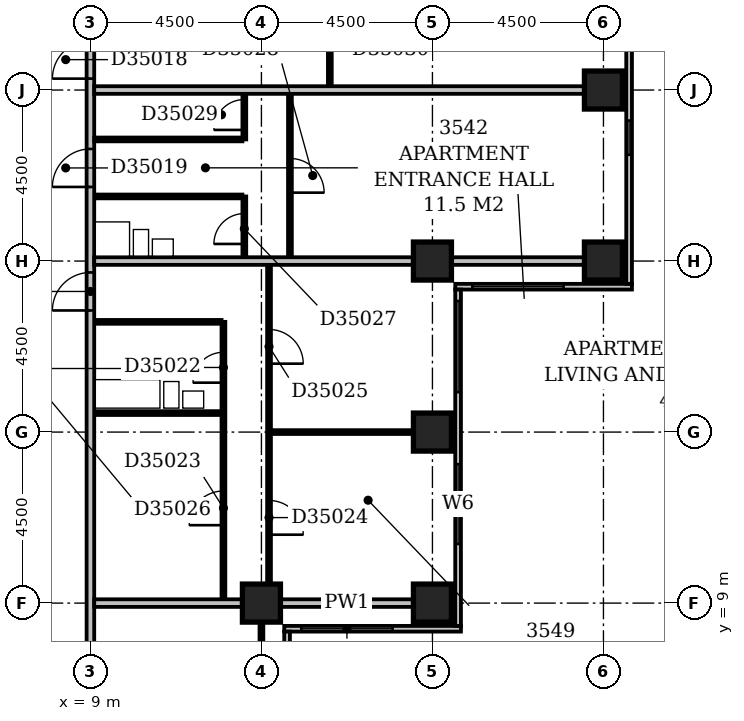
"""IFC4 building model, lengths in metres.
Left out: names, types, materials, properties, quantities, classifications, styles, units other than length and angle.
Written with IfcOpenShell. Run it as: python <this file> out.ifc"""

import sys

from ifc_helpers import new_model, si_unit, direction, frame, frame_2d, origin, origin_2d, place, context, subcontext, project, spatial, rectangle, extrude, element, fill, save


model = new_model("IFC4")
c1 = context("Model", 3, precision=1e-05, world=origin(), true_north=direction((0.0, 1.0)))
c2 = subcontext(c1, "Body", "Model", "MODEL_VIEW")
j1 = project(units=[si_unit("LENGTHUNIT", "METRE"), si_unit("PLANEANGLEUNIT", "RADIAN")], contexts=[c1])
p1 = place(None, origin())
s1 = spatial("IfcSite", under=j1, at=p1, CompositionType="ELEMENT")
p2 = place(p1, origin())
s2 = spatial("IfcBuilding", under=s1, at=p2, CompositionType="ELEMENT")
p3 = place(p2, frame((0.0, 0.0, 141.2)))
s3 = spatial("IfcBuildingStorey", under=s2, at=p3, CompositionType="ELEMENT", Elevation=141.2)
for number, where, z_axis, x_axis in (
    (1, (13.5, 9.0, -0.3), (0.0, 0.0, 1.0), (1.0, 0.0, 0.0)),
    (2, (18.0, 9.0, -0.3), (0.0, 0.0, 1.0), (1.0, 0.0, 0.0)),
    (3, (18.0, 13.5, -0.3), (0.0, 0.0, 1.0), (1.0, 0.0, 0.0)),
    (4, (18.0, 18.0, -0.3), (0.0, 0.0, 1.0), (1.0, 0.0, 0.0)),
    (5, (22.5, 18.0, -0.3), (0.0, 0.0, 1.0), (1.0, 0.0, 0.0)),
    (6, (22.5, 22.5, -0.3), (0.0, 0.0, 1.0), (1.0, 0.0, 0.0)),
):
    element("IfcColumn", number, at=place(p3, frame(where, z_axis=z_axis, x_axis=x_axis)), inside=s3, PredefinedType="COLUMN", context=c2, shape_type="SweptSolid", body=[
        extrude(rectangle(XDim=1.0, YDim=1.0, at=origin_2d()), origin(), (0.0, 0.0, 1.0), 3.6),
    ])
p4 = place(p3, frame((14.175, 3.9, 0.0), z_axis=(0.0, 0.0, 1.0), x_axis=(0.0, 1.0, 0.0)))
e7 = element("IfcWall", 7, at=p4, inside=s3, PredefinedType="STANDARD", context=c2, shape_type="SweptSolid", body=[
    extrude(rectangle(XDim=4.35, YDim=0.15, at=frame_2d((2.175, 0.0))), origin(), (0.0, 0.0, 1.0), 2.7),
])
p5 = place(p4, frame((1.65, 0.0, 0.6)))
e8 = element("IfcOpeningElement", 8, at=p5, cuts=e7, PredefinedType="OPENING", context=c2, shape_type="SweptSolid", body=[
    extrude(rectangle(XDim=2.4, YDim=1.8, at=frame_2d((1.2, 0.9))), frame((0.0, 0.087, 0.0), z_axis=(0.0, -1.0, 0.0), x_axis=(1.0, 0.0, 0.0)), (0.0, 0.0, 1.0), 0.174),
])
p6 = place(p3, frame((14.1, 8.325, 0.0), z_axis=(0.0, 0.0, 1.0), x_axis=(1.0, 0.0, 0.0)))
e9 = element("IfcWall", 9, at=p6, inside=s3, PredefinedType="STANDARD", context=c2, shape_type="SweptSolid", body=[
    extrude(rectangle(XDim=4.65, YDim=0.15, at=frame_2d((2.325, 0.0))), origin(), (0.0, 0.0, 1.0), 2.7),
])
p7 = place(p6, frame((0.45, 0.0, 0.6)))
e10 = element("IfcOpeningElement", 10, at=p7, cuts=e9, PredefinedType="OPENING", context=c2, shape_type="SweptSolid", body=[
    extrude(rectangle(XDim=2.4, YDim=1.8, at=frame_2d((1.2, 0.9))), frame((0.0, 0.087, 0.0), z_axis=(0.0, -1.0, 0.0), x_axis=(1.0, 0.0, 0.0)), (0.0, 0.0, 1.0), 0.174),
])
p8 = place(p3, frame((18.675, 8.4, 0.0), z_axis=(0.0, 0.0, 1.0), x_axis=(0.0, 1.0, 0.0)))
e11 = element("IfcWall", 11, at=p8, inside=s3, PredefinedType="STANDARD", context=c2, shape_type="SweptSolid", body=[
    extrude(rectangle(XDim=8.85, YDim=0.15, at=frame_2d((4.425, 0.0))), origin(), (0.0, 0.0, 1.0), 2.7),
])
p9 = place(p8, frame((2.156, 0.0, 0.6)))
e12 = element("IfcOpeningElement", 12, at=p9, cuts=e11, PredefinedType="OPENING", context=c2, shape_type="SweptSolid", body=[
    extrude(rectangle(XDim=2.1, YDim=1.8, at=frame_2d((1.05, 0.9))), frame((0.0, 0.087, 0.0), z_axis=(0.0, -1.0, 0.0), x_axis=(1.0, 0.0, 0.0)), (0.0, 0.0, 1.0), 0.174),
])
p10 = place(p8, frame((6.15, 0.0, 0.6)))
e13 = element("IfcOpeningElement", 13, at=p10, cuts=e11, PredefinedType="OPENING", context=c2, shape_type="SweptSolid", body=[
    extrude(rectangle(XDim=2.4, YDim=1.8, at=frame_2d((1.2, 0.9))), frame((0.0, 0.087, 0.0), z_axis=(0.0, -1.0, 0.0), x_axis=(1.0, 0.0, 0.0)), (0.0, 0.0, 1.0), 0.174),
])
p11 = place(p3, frame((18.6, 17.325, 0.0), z_axis=(0.0, 0.0, 1.0), x_axis=(1.0, 0.0, 0.0)))
e14 = element("IfcWall", 14, at=p11, inside=s3, PredefinedType="STANDARD", context=c2, shape_type="SweptSolid", body=[
    extrude(rectangle(XDim=4.65, YDim=0.15, at=frame_2d((2.325, 0.0))), origin(), (0.0, 0.0, 1.0), 2.7),
])
p12 = place(p11, frame((0.45, 0.0, 0.6)))
e15 = element("IfcOpeningElement", 15, at=p12, cuts=e14, PredefinedType="OPENING", context=c2, shape_type="SweptSolid", body=[
    extrude(rectangle(XDim=2.4, YDim=1.8, at=frame_2d((1.2, 0.9))), frame((0.0, 0.087, 0.0), z_axis=(0.0, -1.0, 0.0), x_axis=(1.0, 0.0, 0.0)), (0.0, 0.0, 1.0), 0.174),
])
p13 = place(p3, frame((23.175, 17.4, 0.0), z_axis=(0.0, 0.0, 1.0), x_axis=(0.0, 1.0, 0.0)))
e16 = element("IfcWall", 16, at=p13, inside=s3, PredefinedType="STANDARD", context=c2, shape_type="SweptSolid", body=[
    extrude(rectangle(XDim=17.85, YDim=0.15, at=frame_2d((8.925, 0.0))), origin(), (0.0, 0.0, 1.0), 2.7),
])
p14 = place(p13, frame((3.397, 0.0, 0.6)))
e17 = element("IfcOpeningElement", 17, at=p14, cuts=e16, PredefinedType="OPENING", context=c2, shape_type="SweptSolid", body=[
    extrude(rectangle(XDim=0.9, YDim=1.8, at=frame_2d((0.45, 0.9))), frame((0.0, 0.087, 0.0), z_axis=(0.0, -1.0, 0.0), x_axis=(1.0, 0.0, 0.0)), (0.0, 0.0, 1.0), 0.174),
])
p15 = place(p13, frame((6.15, 0.0, 0.6)))
e18 = element("IfcOpeningElement", 18, at=p15, cuts=e16, PredefinedType="OPENING", context=c2, shape_type="SweptSolid", body=[
    extrude(rectangle(XDim=2.4, YDim=1.8, at=frame_2d((1.2, 0.9))), frame((0.0, 0.087, 0.0), z_axis=(0.0, -1.0, 0.0), x_axis=(1.0, 0.0, 0.0)), (0.0, 0.0, 1.0), 0.174),
])
p16 = place(p13, frame((10.65, 0.0, 0.6)))
e19 = element("IfcOpeningElement", 19, at=p16, cuts=e16, PredefinedType="OPENING", context=c2, shape_type="SweptSolid", body=[
    extrude(rectangle(XDim=2.4, YDim=1.8, at=frame_2d((1.2, 0.9))), frame((0.0, 0.087, 0.0), z_axis=(0.0, -1.0, 0.0), x_axis=(1.0, 0.0, 0.0)), (0.0, 0.0, 1.0), 0.174),
])
p17 = place(p13, frame((15.15, 0.0, 0.6)))
e20 = element("IfcOpeningElement", 20, at=p17, cuts=e16, PredefinedType="OPENING", context=c2, shape_type="SweptSolid", body=[
    extrude(rectangle(XDim=2.4, YDim=1.8, at=frame_2d((1.2, 0.9))), frame((0.0, 0.087, 0.0), z_axis=(0.0, -1.0, 0.0), x_axis=(1.0, 0.0, 0.0)), (0.0, 0.0, 1.0), 0.174),
])
p18 = place(p3, frame((9.0, 5.0, 0.0), z_axis=(0.0, 0.0, 1.0), x_axis=(0.0, 1.0, 0.0)))
e21 = element("IfcWall", 21, at=p18, inside=s3, PredefinedType="PARTITIONING", context=c2, shape_type="SweptSolid", body=[
    extrude(rectangle(XDim=27.75, YDim=0.2, at=frame_2d((13.875, 0.0))), origin(), (0.0, 0.0, 1.0), 3.3),
])
p19 = place(p18, frame((17.8, 0.0, 0.0)))
e22 = element("IfcOpeningElement", 22, at=p19, cuts=e21, PredefinedType="OPENING", context=c2, shape_type="SweptSolid", body=[
    extrude(rectangle(XDim=1.0, YDim=2.1, at=frame_2d((0.5, 1.05))), frame((0.0, 0.112, 0.0), z_axis=(0.0, -1.0, 0.0), x_axis=(1.0, 0.0, 0.0)), (0.0, 0.0, 1.0), 0.224),
])
p20 = place(p18, frame((14.95, 0.0, 0.0)))
e23 = element("IfcOpeningElement", 23, at=p20, cuts=e21, PredefinedType="OPENING", context=c2, shape_type="SweptSolid", body=[
    extrude(rectangle(XDim=1.0, YDim=2.1, at=frame_2d((0.5, 1.05))), frame((0.0, 0.112, 0.0), z_axis=(0.0, -1.0, 0.0), x_axis=(1.0, 0.0, 0.0)), (0.0, 0.0, 1.0), 0.224),
])
p21 = place(p18, frame((11.7, 0.0, 0.0)))
e24 = element("IfcOpeningElement", 24, at=p21, cuts=e21, PredefinedType="OPENING", context=c2, shape_type="SweptSolid", body=[
    extrude(rectangle(XDim=1.0, YDim=2.1, at=frame_2d((0.5, 1.05))), frame((0.0, 0.112, 0.0), z_axis=(0.0, -1.0, 0.0), x_axis=(1.0, 0.0, 0.0)), (0.0, 0.0, 1.0), 0.224),
])
p22 = place(p18, frame((1.5, 0.0, 0.0)))
e25 = element("IfcOpeningElement", 25, at=p22, cuts=e21, PredefinedType="OPENING", context=c2, shape_type="SweptSolid", body=[
    extrude(rectangle(XDim=0.9, YDim=2.1, at=frame_2d((0.45, 1.05))), frame((0.0, 0.112, 0.0), z_axis=(0.0, -1.0, 0.0), x_axis=(1.0, 0.0, 0.0)), (0.0, 0.0, 1.0), 0.224),
])
p23 = place(p3, frame((13.5, 5.0, 0.0), z_axis=(0.0, 0.0, 1.0), x_axis=(0.0, 1.0, 0.0)))
e26 = element("IfcWall", 26, at=p23, inside=s3, PredefinedType="PARTITIONING", context=c2, shape_type="SweptSolid", body=[
    extrude(rectangle(XDim=3.5, YDim=0.1, at=frame_2d((1.75, 0.0))), origin(), (0.0, 0.0, 1.0), 2.7),
])
p24 = place(p3, frame((9.1, 9.0, 0.0), z_axis=(0.0, 0.0, 1.0), x_axis=(1.0, 0.0, 0.0)))
e27 = element("IfcWall", 27, at=p24, inside=s3, PredefinedType="PARTITIONING", context=c2, shape_type="SweptSolid", body=[
    extrude(rectangle(XDim=3.9, YDim=0.2, at=frame_2d((1.95, 0.0))), origin(), (0.0, 0.0, 1.0), 3.3),
])
p25 = place(p3, frame((14.0, 9.0, 0.0), z_axis=(0.0, 0.0, 1.0), x_axis=(1.0, 0.0, 0.0)))
e28 = element("IfcWall", 28, at=p25, inside=s3, PredefinedType="PARTITIONING", context=c2, shape_type="SweptSolid", body=[
    extrude(rectangle(XDim=3.5, YDim=0.2, at=frame_2d((1.75, 0.0))), origin(), (0.0, 0.0, 1.0), 2.7),
])
p26 = place(p3, frame((12.5, 9.1, 0.0), z_axis=(0.0, 0.0, 1.0), x_axis=(0.0, 1.0, 0.0)))
e29 = element("IfcWall", 29, at=p26, inside=s3, PredefinedType="PARTITIONING", context=c2, shape_type="SweptSolid", body=[
    extrude(rectangle(XDim=7.3, YDim=0.1, at=frame_2d((3.65, 0.0))), origin(), (0.0, 0.0, 1.0), 3.3),
])
p27 = place(p26, frame((5.7, 0.0, 0.0)))
e30 = element("IfcOpeningElement", 30, at=p27, cuts=e29, PredefinedType="OPENING", context=c2, shape_type="SweptSolid", body=[
    extrude(rectangle(XDim=0.8, YDim=2.1, at=frame_2d((0.4, 1.05))), frame((0.0, 0.062, 0.0), z_axis=(0.0, -1.0, 0.0), x_axis=(1.0, 0.0, 0.0)), (0.0, 0.0, 1.0), 0.124),
])
p28 = place(p26, frame((1.95, 0.0, 0.0)))
e31 = element("IfcOpeningElement", 31, at=p28, cuts=e29, PredefinedType="OPENING", context=c2, shape_type="SweptSolid", body=[
    extrude(rectangle(XDim=0.9, YDim=2.1, at=frame_2d((0.45, 1.05))), frame((0.0, 0.062, 0.0), z_axis=(0.0, -1.0, 0.0), x_axis=(1.0, 0.0, 0.0)), (0.0, 0.0, 1.0), 0.124),
])
p29 = place(p3, frame((13.7, 9.5, 0.0), z_axis=(0.0, 0.0, 1.0), x_axis=(0.0, 1.0, 0.0)))
e32 = element("IfcWall", 32, at=p29, inside=s3, PredefinedType="PARTITIONING", context=c2, shape_type="SweptSolid", body=[
    extrude(rectangle(XDim=8.4, YDim=0.1, at=frame_2d((4.2, 0.0))), origin(), (0.0, 0.0, 1.0), 3.3),
])
p30 = place(p29, frame((1.3, 0.0, 0.0)))
e33 = element("IfcOpeningElement", 33, at=p30, cuts=e32, PredefinedType="OPENING", context=c2, shape_type="SweptSolid", body=[
    extrude(rectangle(XDim=0.9, YDim=2.1, at=frame_2d((0.45, 1.05))), frame((0.0, 0.062, 0.0), z_axis=(0.0, -1.0, 0.0), x_axis=(1.0, 0.0, 0.0)), (0.0, 0.0, 1.0), 0.124),
])
p31 = place(p29, frame((5.8, 0.0, 0.0)))
e34 = element("IfcOpeningElement", 34, at=p31, cuts=e32, PredefinedType="OPENING", context=c2, shape_type="SweptSolid", body=[
    extrude(rectangle(XDim=0.9, YDim=2.1, at=frame_2d((0.45, 1.05))), frame((0.0, 0.062, 0.0), z_axis=(0.0, -1.0, 0.0), x_axis=(1.0, 0.0, 0.0)), (0.0, 0.0, 1.0), 0.124),
])
p32 = place(p3, frame((13.75, 13.5, 0.0), z_axis=(0.0, 0.0, 1.0), x_axis=(1.0, 0.0, 0.0)))
e35 = element("IfcWall", 35, at=p32, inside=s3, PredefinedType="PARTITIONING", context=c2, shape_type="SweptSolid", body=[
    extrude(rectangle(XDim=3.75, YDim=0.1, at=frame_2d((1.875, 0.0))), origin(), (0.0, 0.0, 1.0), 3.3),
])
for number, where, z_axis, x_axis in (
    (36, (9.1, 14.0, 0.0), (0.0, 0.0, 1.0), (1.0, 0.0, 0.0)),
    (37, (9.1, 16.4, 0.0), (0.0, 0.0, 1.0), (1.0, 0.0, 0.0)),
):
    element("IfcWall", number, at=place(p3, frame(where, z_axis=z_axis, x_axis=x_axis)), inside=s3, PredefinedType="PLUMBINGWALL", context=c2, shape_type="SweptSolid", body=[
        extrude(rectangle(XDim=3.35, YDim=0.1, at=frame_2d((1.675, 0.0))), origin(), (0.0, 0.0, 1.0), 3.3),
    ])
p33 = place(p3, frame((9.1, 18.0, 0.0), z_axis=(0.0, 0.0, 1.0), x_axis=(1.0, 0.0, 0.0)))
e38 = element("IfcWall", 38, at=p33, inside=s3, PredefinedType="PARTITIONING", context=c2, shape_type="SweptSolid", body=[
    extrude(rectangle(XDim=8.4, YDim=0.2, at=frame_2d((4.2, 0.0))), origin(), (0.0, 0.0, 1.0), 2.6),
])
p34 = place(p3, frame((18.5, 18.0, 0.0), z_axis=(0.0, 0.0, 1.0), x_axis=(1.0, 0.0, 0.0)))
e39 = element("IfcWall", 39, at=p34, inside=s3, PredefinedType="PARTITIONING", context=c2, shape_type="SweptSolid", body=[
    extrude(rectangle(XDim=3.5, YDim=0.2, at=frame_2d((1.75, 0.0))), origin(), (0.0, 0.0, 1.0), 2.7),
])
p35 = place(p3, frame((13.05, 18.1, 0.0), z_axis=(0.0, 0.0, 1.0), x_axis=(0.0, 1.0, 0.0)))
e40 = element("IfcWall", 40, at=p35, inside=s3, PredefinedType="PARTITIONING", context=c2, shape_type="SweptSolid", body=[
    extrude(rectangle(XDim=1.6, YDim=0.1, at=frame_2d((0.8, 0.0))), origin(), (0.0, 0.0, 1.0), 3.3),
])
p36 = place(p35, frame((0.35, 0.0, 0.0)))
e41 = element("IfcOpeningElement", 41, at=p36, cuts=e40, PredefinedType="OPENING", context=c2, shape_type="SweptSolid", body=[
    extrude(rectangle(XDim=0.8, YDim=2.1, at=frame_2d((0.4, 1.05))), frame((0.0, 0.062, 0.0), z_axis=(0.0, -1.0, 0.0), x_axis=(1.0, 0.0, 0.0)), (0.0, 0.0, 1.0), 0.124),
])
p37 = place(p3, frame((14.25, 18.1, 0.0), z_axis=(0.0, 0.0, 1.0), x_axis=(0.0, 1.0, 0.0)))
e42 = element("IfcWall", 42, at=p37, inside=s3, PredefinedType="PARTITIONING", context=c2, shape_type="SweptSolid", body=[
    extrude(rectangle(XDim=4.3, YDim=0.1, at=frame_2d((2.15, 0.0))), origin(), (0.0, 0.0, 1.0), 3.3),
])
p38 = place(p37, frame((1.7, 0.0, 0.0)))
e43 = element("IfcOpeningElement", 43, at=p38, cuts=e42, PredefinedType="OPENING", context=c2, shape_type="SweptSolid", body=[
    extrude(rectangle(XDim=0.9, YDim=2.1, at=frame_2d((0.45, 1.05))), frame((0.0, 0.062, 0.0), z_axis=(0.0, -1.0, 0.0), x_axis=(1.0, 0.0, 0.0)), (0.0, 0.0, 1.0), 0.124),
])
p39 = place(p3, frame((9.1, 19.7, 0.0), z_axis=(0.0, 0.0, 1.0), x_axis=(1.0, 0.0, 0.0)))
e44 = element("IfcWall", 44, at=p39, inside=s3, PredefinedType="PLUMBINGWALL", context=c2, shape_type="SweptSolid", body=[
    extrude(rectangle(XDim=3.9, YDim=0.1, at=frame_2d((1.95, 0.0))), origin(), (0.0, 0.0, 1.0), 3.3),
])
p40 = place(p3, frame((9.1, 21.2, 0.0), z_axis=(0.0, 0.0, 1.0), x_axis=(1.0, 0.0, 0.0)))
e45 = element("IfcWall", 45, at=p40, inside=s3, PredefinedType="PARTITIONING", context=c2, shape_type="SweptSolid", body=[
    extrude(rectangle(XDim=3.9, YDim=0.1, at=frame_2d((1.95, 0.0))), origin(), (0.0, 0.0, 1.0), 3.3),
])
p41 = place(p3, frame((13.05, 21.2, 0.0), z_axis=(0.0, 0.0, 1.0), x_axis=(0.0, 1.0, 0.0)))
e46 = element("IfcWall", 46, at=p41, inside=s3, PredefinedType="PARTITIONING", context=c2, shape_type="SweptSolid", body=[
    extrude(rectangle(XDim=1.2, YDim=0.1, at=frame_2d((0.6, 0.0))), origin(), (0.0, 0.0, 1.0), 3.3),
])
p42 = place(p41, frame((0.25, 0.0, 0.0)))
e47 = element("IfcOpeningElement", 47, at=p42, cuts=e46, PredefinedType="OPENING", context=c2, shape_type="SweptSolid", body=[
    extrude(rectangle(XDim=0.8, YDim=2.1, at=frame_2d((0.4, 1.05))), frame((0.0, 0.062, 0.0), z_axis=(0.0, -1.0, 0.0), x_axis=(1.0, 0.0, 0.0)), (0.0, 0.0, 1.0), 0.124),
])
p43 = place(p3, frame((9.1, 22.5, 0.0), z_axis=(0.0, 0.0, 1.0), x_axis=(1.0, 0.0, 0.0)))
e48 = element("IfcWall", 48, at=p43, inside=s3, PredefinedType="PARTITIONING", context=c2, shape_type="SweptSolid", body=[
    extrude(rectangle(XDim=12.9, YDim=0.2, at=frame_2d((6.45, 0.0))), origin(), (0.0, 0.0, 1.0), 3.3),
])
p44 = place(p3, frame((15.3, 22.6, 0.0), z_axis=(0.0, 0.0, 1.0), x_axis=(0.0, 1.0, 0.0)))
e49 = element("IfcWall", 49, at=p44, inside=s3, PredefinedType="PARTITIONING", context=c2, shape_type="SweptSolid", body=[
    extrude(rectangle(XDim=8.8, YDim=0.1, at=frame_2d((4.4, 0.0))), origin(), (0.0, 0.0, 1.0), 3.3),
])
p45 = place(p44, frame((1.7, 0.0, 0.0)))
e50 = element("IfcOpeningElement", 50, at=p45, cuts=e49, PredefinedType="OPENING", context=c2, shape_type="SweptSolid", body=[
    extrude(rectangle(XDim=0.9, YDim=2.1, at=frame_2d((0.45, 1.05))), frame((0.0, 0.062, 0.0), z_axis=(0.0, -1.0, 0.0), x_axis=(1.0, 0.0, 0.0)), (0.0, 0.0, 1.0), 0.124),
])
p46 = place(p44, frame((6.2, 0.0, 0.0)))
e51 = element("IfcOpeningElement", 51, at=p46, cuts=e49, PredefinedType="OPENING", context=c2, shape_type="SweptSolid", body=[
    extrude(rectangle(XDim=0.9, YDim=2.1, at=frame_2d((0.45, 1.05))), frame((0.0, 0.062, 0.0), z_axis=(0.0, -1.0, 0.0), x_axis=(1.0, 0.0, 0.0)), (0.0, 0.0, 1.0), 0.124),
])
p47 = place(p7, origin())
e52 = element("IfcWindow", 52, at=p47, inside=s3, PartitioningType="SINGLE_PANEL", PredefinedType="WINDOW", context=c2, shape_type="SweptSolid", body=[
    extrude(rectangle(XDim=2.4, YDim=1.8, at=frame_2d((1.2, 0.9))), frame((0.0, 0.03, 0.0), z_axis=(0.0, -1.0, 0.0), x_axis=(1.0, 0.0, 0.0)), (0.0, 0.0, 1.0), 0.06),
])
fill(e10, e52)
p48 = place(p9, origin())
e53 = element("IfcWindow", 53, at=p48, inside=s3, PartitioningType="SINGLE_PANEL", PredefinedType="WINDOW", context=c2, shape_type="SweptSolid", body=[
    extrude(rectangle(XDim=2.1, YDim=1.8, at=frame_2d((1.05, 0.9))), frame((0.0, 0.03, 0.0), z_axis=(0.0, -1.0, 0.0), x_axis=(1.0, 0.0, 0.0)), (0.0, 0.0, 1.0), 0.06),
])
fill(e12, e53)
p49 = place(p10, origin())
e54 = element("IfcWindow", 54, at=p49, inside=s3, PartitioningType="SINGLE_PANEL", PredefinedType="WINDOW", context=c2, shape_type="SweptSolid", body=[
    extrude(rectangle(XDim=2.4, YDim=1.8, at=frame_2d((1.2, 0.9))), frame((0.0, 0.03, 0.0), z_axis=(0.0, -1.0, 0.0), x_axis=(1.0, 0.0, 0.0)), (0.0, 0.0, 1.0), 0.06),
])
fill(e13, e54)
p50 = place(p12, origin())
e55 = element("IfcWindow", 55, at=p50, inside=s3, PartitioningType="SINGLE_PANEL", PredefinedType="WINDOW", context=c2, shape_type="SweptSolid", body=[
    extrude(rectangle(XDim=2.4, YDim=1.8, at=frame_2d((1.2, 0.9))), frame((0.0, 0.03, 0.0), z_axis=(0.0, -1.0, 0.0), x_axis=(1.0, 0.0, 0.0)), (0.0, 0.0, 1.0), 0.06),
])
fill(e15, e55)
p51 = place(p14, origin())
e56 = element("IfcWindow", 56, at=p51, inside=s3, PartitioningType="SINGLE_PANEL", PredefinedType="WINDOW", context=c2, shape_type="SweptSolid", body=[
    extrude(rectangle(XDim=0.9, YDim=1.8, at=frame_2d((0.45, 0.9))), frame((0.0, 0.03, 0.0), z_axis=(0.0, -1.0, 0.0), x_axis=(1.0, 0.0, 0.0)), (0.0, 0.0, 1.0), 0.06),
])
fill(e17, e56)
p52 = place(p19, origin())
e57 = element("IfcDoor", 57, at=p52, inside=s3, OperationType="SINGLE_SWING_LEFT", PredefinedType="DOOR", context=c2, shape_type="SweptSolid", body=[
    extrude(rectangle(XDim=1.0, YDim=2.1, at=frame_2d((0.5, 1.05))), frame((0.0, 0.025, 0.0), z_axis=(0.0, -1.0, 0.0), x_axis=(1.0, 0.0, 0.0)), (0.0, 0.0, 1.0), 0.05),
])
fill(e22, e57)
p53 = place(p20, origin())
e58 = element("IfcDoor", 58, at=p53, inside=s3, OperationType="SINGLE_SWING_LEFT", PredefinedType="DOOR", context=c2, shape_type="SweptSolid", body=[
    extrude(rectangle(XDim=1.0, YDim=2.1, at=frame_2d((0.5, 1.05))), frame((0.0, 0.025, 0.0), z_axis=(0.0, -1.0, 0.0), x_axis=(1.0, 0.0, 0.0)), (0.0, 0.0, 1.0), 0.05),
])
fill(e23, e58)
p54 = place(p21, origin())
e59 = element("IfcDoor", 59, at=p54, inside=s3, OperationType="SINGLE_SWING_LEFT", PredefinedType="DOOR", context=c2, shape_type="SweptSolid", body=[
    extrude(rectangle(XDim=1.0, YDim=2.1, at=frame_2d((0.5, 1.05))), frame((0.0, 0.025, 0.0), z_axis=(0.0, -1.0, 0.0), x_axis=(1.0, 0.0, 0.0)), (0.0, 0.0, 1.0), 0.05),
])
fill(e24, e59)
p55 = place(p27, origin())
e60 = element("IfcDoor", 60, at=p55, inside=s3, OperationType="SINGLE_SWING_LEFT", PredefinedType="DOOR", context=c2, shape_type="SweptSolid", body=[
    extrude(rectangle(XDim=0.8, YDim=2.1, at=frame_2d((0.4, 1.05))), frame((0.0, 0.025, 0.0), z_axis=(0.0, -1.0, 0.0), x_axis=(1.0, 0.0, 0.0)), (0.0, 0.0, 1.0), 0.05),
])
fill(e30, e60)
p56 = place(p28, origin())
e61 = element("IfcDoor", 61, at=p56, inside=s3, OperationType="SINGLE_SWING_LEFT", PredefinedType="DOOR", context=c2, shape_type="SweptSolid", body=[
    extrude(rectangle(XDim=0.9, YDim=2.1, at=frame_2d((0.45, 1.05))), frame((0.0, 0.025, 0.0), z_axis=(0.0, -1.0, 0.0), x_axis=(1.0, 0.0, 0.0)), (0.0, 0.0, 1.0), 0.05),
])
fill(e31, e61)
p57 = place(p30, frame((0.9, 0.0, 0.0), z_axis=(0.0, 0.0, 1.0), x_axis=(-1.0, 0.0, 0.0)))
e62 = element("IfcDoor", 62, at=p57, inside=s3, OperationType="SINGLE_SWING_RIGHT", PredefinedType="DOOR", context=c2, shape_type="SweptSolid", body=[
    extrude(rectangle(XDim=0.9, YDim=2.1, at=frame_2d((0.45, 1.05))), frame((0.0, 0.025, 0.0), z_axis=(0.0, -1.0, 0.0), x_axis=(1.0, 0.0, 0.0)), (0.0, 0.0, 1.0), 0.05),
])
fill(e33, e62)
p58 = place(p31, frame((0.9, 0.0, 0.0), z_axis=(0.0, 0.0, 1.0), x_axis=(-1.0, 0.0, 0.0)))
e63 = element("IfcDoor", 63, at=p58, inside=s3, OperationType="SINGLE_SWING_RIGHT", PredefinedType="DOOR", context=c2, shape_type="SweptSolid", body=[
    extrude(rectangle(XDim=0.9, YDim=2.1, at=frame_2d((0.45, 1.05))), frame((0.0, 0.025, 0.0), z_axis=(0.0, -1.0, 0.0), x_axis=(1.0, 0.0, 0.0)), (0.0, 0.0, 1.0), 0.05),
])
fill(e34, e63)
p59 = place(p36, origin())
e64 = element("IfcDoor", 64, at=p59, inside=s3, OperationType="SINGLE_SWING_LEFT", PredefinedType="DOOR", context=c2, shape_type="SweptSolid", body=[
    extrude(rectangle(XDim=0.8, YDim=2.1, at=frame_2d((0.4, 1.05))), frame((0.0, 0.025, 0.0), z_axis=(0.0, -1.0, 0.0), x_axis=(1.0, 0.0, 0.0)), (0.0, 0.0, 1.0), 0.05),
])
fill(e41, e64)
p60 = place(p38, frame((0.9, 0.0, 0.0), z_axis=(0.0, 0.0, 1.0), x_axis=(-1.0, 0.0, 0.0)))
e65 = element("IfcDoor", 65, at=p60, inside=s3, OperationType="SINGLE_SWING_RIGHT", PredefinedType="DOOR", context=c2, shape_type="SweptSolid", body=[
    extrude(rectangle(XDim=0.9, YDim=2.1, at=frame_2d((0.45, 1.05))), frame((0.0, 0.025, 0.0), z_axis=(0.0, -1.0, 0.0), x_axis=(1.0, 0.0, 0.0)), (0.0, 0.0, 1.0), 0.05),
])
fill(e43, e65)
p61 = place(p42, origin())
e66 = element("IfcDoor", 66, at=p61, inside=s3, OperationType="SINGLE_SWING_LEFT", PredefinedType="DOOR", context=c2, shape_type="SweptSolid", body=[
    extrude(rectangle(XDim=0.8, YDim=2.1, at=frame_2d((0.4, 1.05))), frame((0.0, 0.025, 0.0), z_axis=(0.0, -1.0, 0.0), x_axis=(1.0, 0.0, 0.0)), (0.0, 0.0, 1.0), 0.05),
])
fill(e47, e66)
save(model, sys.argv[1])
